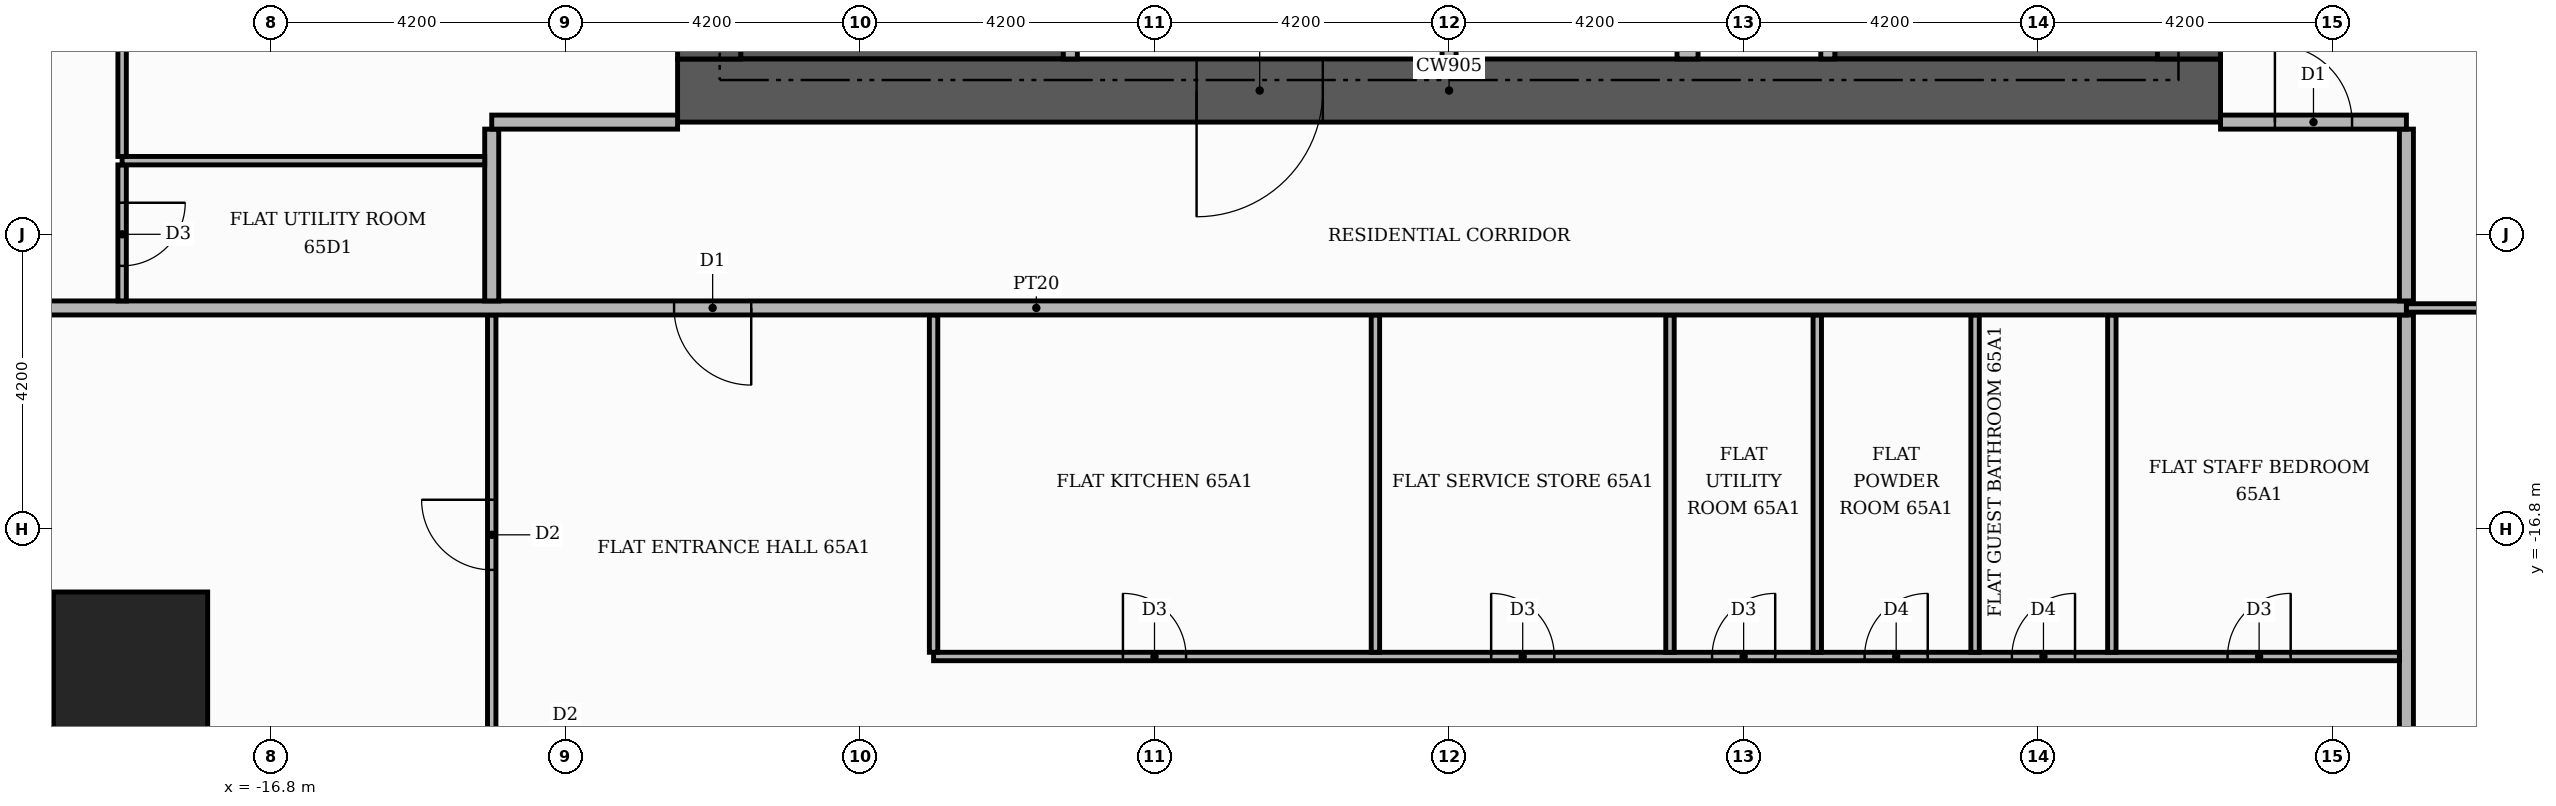
"""IFC4 building model, lengths in metres.
Left out: names, types, materials, properties, quantities, classifications, styles, units other than length and angle.
Written with IfcOpenShell. Run it as: python <this file> out.ifc"""

import sys

from ifc_helpers import new_model, si_unit, direction, frame, frame_2d, origin, origin_2d, place, context, subcontext, project, spatial, rectangle, extrude, element, fill, save


model = new_model("IFC4")
c1 = context("Model", 3, precision=1e-05, world=origin(), true_north=direction((0.0, 1.0)))
c2 = subcontext(c1, "Body", "Model", "MODEL_VIEW")
j1 = project(units=[si_unit("LENGTHUNIT", "METRE"), si_unit("PLANEANGLEUNIT", "RADIAN")], contexts=[c1])
p1 = place(None, origin())
s1 = spatial("IfcSite", under=j1, at=p1, CompositionType="ELEMENT")
p2 = place(p1, origin())
s2 = spatial("IfcBuilding", under=s1, at=p2, CompositionType="ELEMENT")
p3 = place(p2, frame((0.0, 0.0, 271.8)))
s3 = spatial("IfcBuildingStorey", under=s2, at=p3, CompositionType="ELEMENT", Elevation=271.8)
for number, where, z_axis, x_axis in (
    (1, (-10.1, -9.15, 0.0), (0.0, 0.0, 1.0), (1.0, 0.0, 0.0)),
    (2, (5.5, -9.15, 0.0), (0.0, 0.0, 1.0), (1.0, 0.0, 0.0)),
):
    element("IfcWall", number, at=place(p3, frame(where, z_axis=z_axis, x_axis=x_axis)), inside=s3, PredefinedType="SHEAR", context=c2, shape_type="SweptSolid", body=[
        extrude(rectangle(XDim=4.6, YDim=1.9, at=frame_2d((2.3, 0.0))), origin(), (0.0, 0.0, 1.0), 3.48),
    ])
p4 = place(p3, frame((-11.0, -10.55, 0.0), z_axis=(0.0, 0.0, 1.0), x_axis=(1.0, 0.0, 0.0)))
e3 = element("IfcWall", 3, at=p4, inside=s3, PredefinedType="SHEAR", context=c2, shape_type="SweptSolid", body=[
    extrude(rectangle(XDim=22.0, YDim=0.9, at=frame_2d((11.0, 0.0))), origin(), (0.0, 0.0, 1.0), 3.48),
])
p5 = place(p4, frame((7.4, 0.0, 0.0)))
e4 = element("IfcOpeningElement", 4, at=p5, cuts=e3, PredefinedType="OPENING", context=c2, shape_type="SweptSolid", body=[
    extrude(rectangle(XDim=1.8, YDim=2.2, at=frame_2d((0.9, 1.1))), frame((0.0, 0.46, 0.0), z_axis=(0.0, -1.0, 0.0), x_axis=(1.0, 0.0, 0.0)), (0.0, 0.0, 1.0), 0.92),
])
for number, where, z_axis, x_axis in (
    (5, (-10.55, -10.1, 0.0), (0.0, 0.0, 1.0), (0.0, 1.0, 0.0)),
    (6, (10.55, -10.1, 0.0), (0.0, 0.0, 1.0), (0.0, 1.0, 0.0)),
):
    element("IfcWall", number, at=place(p3, frame(where, z_axis=z_axis, x_axis=x_axis)), inside=s3, PredefinedType="SHEAR", context=c2, shape_type="SweptSolid", body=[
        extrude(rectangle(XDim=20.2, YDim=0.9, at=frame_2d((10.1, 0.0))), origin(), (0.0, 0.0, 1.0), 3.48),
    ])
p6 = place(p3, frame((-18.8, -18.8, 0.0), z_axis=(0.0, 0.0, 1.0), x_axis=(1.0, 0.0, 0.0)))
e7 = element("IfcColumn", 7, at=p6, inside=s3, PredefinedType="COLUMN", context=c2, shape_type="SweptSolid", body=[
    extrude(rectangle(XDim=2.2, YDim=2.2, at=origin_2d()), origin(), (0.0, 0.0, 1.0), 3.9),
])
p7 = place(p3, frame((-5.4, -10.1, 0.0), z_axis=(0.0, 0.0, 1.0), x_axis=(0.0, 1.0, 0.0)))
e8 = element("IfcWall", 8, at=p7, inside=s3, PredefinedType="PARTITIONING", context=c2, shape_type="SweptSolid", body=[
    extrude(rectangle(XDim=4.6, YDim=0.2, at=frame_2d((2.3, 0.0))), origin(), (0.0, 0.0, 1.0), 3.48),
])
p8 = place(p7, frame((2.9, 0.0, 0.0)))
e9 = element("IfcOpeningElement", 9, at=p8, cuts=e8, PredefinedType="OPENING", context=c2, shape_type="SweptSolid", body=[
    extrude(rectangle(XDim=1.0, YDim=2.1, at=frame_2d((0.5, 1.05))), frame((0.0, 0.11, 0.0), z_axis=(0.0, -1.0, 0.0), x_axis=(1.0, 0.0, 0.0)), (0.0, 0.0, 1.0), 0.22),
])
p9 = place(p3, frame((0.0, -10.1, 0.0), z_axis=(0.0, 0.0, 1.0), x_axis=(0.0, 1.0, 0.0)))
e10 = element("IfcWall", 10, at=p9, inside=s3, PredefinedType="PARTITIONING", context=c2, shape_type="SweptSolid", body=[
    extrude(rectangle(XDim=2.2, YDim=0.2, at=frame_2d((1.1, 0.0))), origin(), (0.0, 0.0, 1.0), 3.48),
])
p10 = place(p3, frame((3.4, -10.1, 0.0), z_axis=(0.0, 0.0, 1.0), x_axis=(0.0, 1.0, 0.0)))
e11 = element("IfcWall", 11, at=p10, inside=s3, PredefinedType="PARTITIONING", context=c2, shape_type="SweptSolid", body=[
    extrude(rectangle(XDim=2.2, YDim=0.3, at=frame_2d((1.1, 0.0))), origin(), (0.0, 0.0, 1.0), 3.48),
])
p11 = place(p3, frame((5.4, -10.1, 0.0), z_axis=(0.0, 0.0, 1.0), x_axis=(0.0, 1.0, 0.0)))
e12 = element("IfcWall", 12, at=p11, inside=s3, PredefinedType="PARTITIONING", context=c2, shape_type="SweptSolid", body=[
    extrude(rectangle(XDim=4.6, YDim=0.2, at=frame_2d((2.3, 0.0))), origin(), (0.0, 0.0, 1.0), 3.48),
])
p12 = place(p11, frame((2.9, 0.0, 0.0)))
e13 = element("IfcOpeningElement", 13, at=p12, cuts=e12, PredefinedType="OPENING", context=c2, shape_type="SweptSolid", body=[
    extrude(rectangle(XDim=1.0, YDim=2.1, at=frame_2d((0.5, 1.05))), frame((0.0, 0.11, 0.0), z_axis=(0.0, -1.0, 0.0), x_axis=(1.0, 0.0, 0.0)), (0.0, 0.0, 1.0), 0.22),
])
p13 = place(p3, frame((13.65, -25.42, 0.0), z_axis=(0.0, 0.0, 1.0), x_axis=(0.0, 1.0, 0.0)))
e14 = element("IfcWall", 14, at=p13, inside=s3, PredefinedType="PARTITIONING", context=c2, shape_type="SweptSolid", body=[
    extrude(rectangle(XDim=11.67, YDim=0.2, at=frame_2d((5.835, 0.0))), origin(), (0.0, 0.0, 1.0), 3.48),
])
p14 = place(p3, frame((-13.65, -20.06, 0.0), z_axis=(0.0, 0.0, 1.0), x_axis=(0.0, 1.0, 0.0)))
e15 = element("IfcWall", 15, at=p14, inside=s3, PredefinedType="PARTITIONING", context=c2, shape_type="SweptSolid", body=[
    extrude(rectangle(XDim=6.31, YDim=0.12, at=frame_2d((3.155, 0.0))), origin(), (0.0, 0.0, 1.0), 3.48),
])
p15 = place(p14, frame((2.675, 0.0, 0.0)))
e16 = element("IfcOpeningElement", 16, at=p15, cuts=e15, PredefinedType="OPENING", context=c2, shape_type="SweptSolid", body=[
    extrude(rectangle(XDim=1.0, YDim=2.1, at=frame_2d((0.5, 1.05))), frame((0.0, 0.07, 0.0), z_axis=(0.0, -1.0, 0.0), x_axis=(1.0, 0.0, 0.0)), (0.0, 0.0, 1.0), 0.14),
])
p16 = place(p3, frame((-7.35, -18.62, 0.0), z_axis=(0.0, 0.0, 1.0), x_axis=(1.0, 0.0, 0.0)))
e17 = element("IfcWall", 17, at=p16, inside=s3, PredefinedType="PARTITIONING", context=c2, shape_type="SweptSolid", body=[
    extrude(rectangle(XDim=20.9, YDim=0.12, at=frame_2d((10.45, 0.0))), origin(), (0.0, 0.0, 1.0), 3.48),
])
p17 = place(p16, frame((2.7, 0.0, 0.0)))
e18 = element("IfcOpeningElement", 18, at=p17, cuts=e17, PredefinedType="OPENING", context=c2, shape_type="SweptSolid", body=[
    extrude(rectangle(XDim=0.9, YDim=2.1, at=frame_2d((0.45, 1.05))), frame((0.0, 0.07, 0.0), z_axis=(0.0, -1.0, 0.0), x_axis=(1.0, 0.0, 0.0)), (0.0, 0.0, 1.0), 0.14),
])
p18 = place(p16, frame((7.95, 0.0, 0.0)))
e19 = element("IfcOpeningElement", 19, at=p18, cuts=e17, PredefinedType="OPENING", context=c2, shape_type="SweptSolid", body=[
    extrude(rectangle(XDim=0.9, YDim=2.1, at=frame_2d((0.45, 1.05))), frame((0.0, 0.07, 0.0), z_axis=(0.0, -1.0, 0.0), x_axis=(1.0, 0.0, 0.0)), (0.0, 0.0, 1.0), 0.14),
])
p19 = place(p16, frame((11.1, 0.0, 0.0)))
e20 = element("IfcOpeningElement", 20, at=p19, cuts=e17, PredefinedType="OPENING", context=c2, shape_type="SweptSolid", body=[
    extrude(rectangle(XDim=0.9, YDim=2.1, at=frame_2d((0.45, 1.05))), frame((0.0, 0.07, 0.0), z_axis=(0.0, -1.0, 0.0), x_axis=(1.0, 0.0, 0.0)), (0.0, 0.0, 1.0), 0.14),
])
p20 = place(p16, frame((13.275, 0.0, 0.0)))
e21 = element("IfcOpeningElement", 21, at=p20, cuts=e17, PredefinedType="OPENING", context=c2, shape_type="SweptSolid", body=[
    extrude(rectangle(XDim=0.9, YDim=2.1, at=frame_2d((0.45, 1.05))), frame((0.0, 0.07, 0.0), z_axis=(0.0, -1.0, 0.0), x_axis=(1.0, 0.0, 0.0)), (0.0, 0.0, 1.0), 0.14),
])
p21 = place(p16, frame((15.375, 0.0, 0.0)))
e22 = element("IfcOpeningElement", 22, at=p21, cuts=e17, PredefinedType="OPENING", context=c2, shape_type="SweptSolid", body=[
    extrude(rectangle(XDim=0.9, YDim=2.1, at=frame_2d((0.45, 1.05))), frame((0.0, 0.07, 0.0), z_axis=(0.0, -1.0, 0.0), x_axis=(1.0, 0.0, 0.0)), (0.0, 0.0, 1.0), 0.14),
])
p22 = place(p16, frame((18.45, 0.0, 0.0)))
e23 = element("IfcOpeningElement", 23, at=p22, cuts=e17, PredefinedType="OPENING", context=c2, shape_type="SweptSolid", body=[
    extrude(rectangle(XDim=0.9, YDim=2.1, at=frame_2d((0.45, 1.05))), frame((0.0, 0.07, 0.0), z_axis=(0.0, -1.0, 0.0), x_axis=(1.0, 0.0, 0.0)), (0.0, 0.0, 1.0), 0.14),
])
for number, where, z_axis, x_axis in (
    (24, (-7.35, -18.56, 0.0), (0.0, 0.0, 1.0), (0.0, 1.0, 0.0)),
    (25, (-1.05, -18.56, 0.0), (0.0, 0.0, 1.0), (0.0, 1.0, 0.0)),
    (26, (3.15, -18.56, 0.0), (0.0, 0.0, 1.0), (0.0, 1.0, 0.0)),
    (27, (5.25, -18.56, 0.0), (0.0, 0.0, 1.0), (0.0, 1.0, 0.0)),
    (28, (7.5, -18.56, 0.0), (0.0, 0.0, 1.0), (0.0, 1.0, 0.0)),
    (29, (9.45, -18.56, 0.0), (0.0, 0.0, 1.0), (0.0, 1.0, 0.0)),
):
    element("IfcWall", number, at=place(p3, frame(where, z_axis=z_axis, x_axis=x_axis)), inside=s3, PredefinedType="PARTITIONING", context=c2, shape_type="SweptSolid", body=[
        extrude(rectangle(XDim=4.81, YDim=0.12, at=frame_2d((2.405, 0.0))), origin(), (0.0, 0.0, 1.0), 3.48),
    ])
p23 = place(p3, frame((-25.42, -13.65, 0.0), z_axis=(0.0, 0.0, 1.0), x_axis=(1.0, 0.0, 0.0)))
e30 = element("IfcWall", 30, at=p23, inside=s3, PredefinedType="PARTITIONING", context=c2, shape_type="SweptSolid", body=[
    extrude(rectangle(XDim=39.07, YDim=0.2, at=frame_2d((19.535, 0.0))), origin(), (0.0, 0.0, 1.0), 3.48),
])
p24 = place(p23, frame((14.37, 0.0, 0.0)))
e31 = element("IfcOpeningElement", 31, at=p24, cuts=e30, PredefinedType="OPENING", context=c2, shape_type="SweptSolid", body=[
    extrude(rectangle(XDim=1.1, YDim=2.4, at=frame_2d((0.55, 1.2))), frame((0.0, 0.11, 0.0), z_axis=(0.0, -1.0, 0.0), x_axis=(1.0, 0.0, 0.0)), (0.0, 0.0, 1.0), 0.22),
])
p25 = place(p3, frame((13.65, -13.65, 0.0), z_axis=(0.0, 0.0, 1.0), x_axis=(1.0, 0.0, 0.0)))
e32 = element("IfcWall", 32, at=p25, inside=s3, PredefinedType="PARTITIONING", context=c2, shape_type="SweptSolid", body=[
    extrude(rectangle(XDim=6.17, YDim=0.12, at=frame_2d((3.085, 0.0))), origin(), (0.0, 0.0, 1.0), 3.48),
])
p26 = place(p25, frame((2.635, 0.0, 0.0)))
e33 = element("IfcOpeningElement", 33, at=p26, cuts=e32, PredefinedType="OPENING", context=c2, shape_type="SweptSolid", body=[
    extrude(rectangle(XDim=0.9, YDim=2.1, at=frame_2d((0.45, 1.05))), frame((0.0, 0.07, 0.0), z_axis=(0.0, -1.0, 0.0), x_axis=(1.0, 0.0, 0.0)), (0.0, 0.0, 1.0), 0.14),
])
p27 = place(p3, frame((-18.92, -13.55, 0.0), z_axis=(0.0, 0.0, 1.0), x_axis=(0.0, 1.0, 0.0)))
e34 = element("IfcWall", 34, at=p27, inside=s3, PredefinedType="PARTITIONING", context=c2, shape_type="SweptSolid", body=[
    extrude(rectangle(XDim=1.94, YDim=0.12, at=frame_2d((0.97, 0.0))), origin(), (0.0, 0.0, 1.0), 3.48),
])
p28 = place(p27, frame((0.5, 0.0, 0.0)))
e35 = element("IfcOpeningElement", 35, at=p28, cuts=e34, PredefinedType="OPENING", context=c2, shape_type="SweptSolid", body=[
    extrude(rectangle(XDim=0.9, YDim=2.1, at=frame_2d((0.45, 1.05))), frame((0.0, 0.07, 0.0), z_axis=(0.0, -1.0, 0.0), x_axis=(1.0, 0.0, 0.0)), (0.0, 0.0, 1.0), 0.14),
])
for number, where, z_axis, x_axis in (
    (36, (-13.65, -13.55, 0.0), (0.0, 0.0, 1.0), (0.0, 1.0, 0.0)),
    (37, (13.65, -13.55, 0.0), (0.0, 0.0, 1.0), (0.0, 1.0, 0.0)),
):
    element("IfcWall", number, at=place(p3, frame(where, z_axis=z_axis, x_axis=x_axis)), inside=s3, PredefinedType="PARTITIONING", context=c2, shape_type="SweptSolid", body=[
        extrude(rectangle(XDim=2.45, YDim=0.2, at=frame_2d((1.225, 0.0))), origin(), (0.0, 0.0, 1.0), 3.48),
    ])
p29 = place(p3, frame((-18.92, -11.55, 0.0), z_axis=(0.0, 0.0, 1.0), x_axis=(1.0, 0.0, 0.0)))
e38 = element("IfcWall", 38, at=p29, inside=s3, PredefinedType="PARTITIONING", context=c2, shape_type="SweptSolid", body=[
    extrude(rectangle(XDim=5.17, YDim=0.12, at=frame_2d((2.585, 0.0))), origin(), (0.0, 0.0, 1.0), 3.48),
])
p30 = place(p3, frame((-18.92, -11.49, 0.0), z_axis=(0.0, 0.0, 1.0), x_axis=(0.0, 1.0, 0.0)))
e39 = element("IfcWall", 39, at=p30, inside=s3, PredefinedType="PARTITIONING", context=c2, shape_type="SweptSolid", body=[
    extrude(rectangle(XDim=4.38, YDim=0.12, at=frame_2d((2.19, 0.0))), origin(), (0.0, 0.0, 1.0), 3.48),
])
p31 = place(p30, frame((1.74, 0.0, 0.0)))
e40 = element("IfcOpeningElement", 40, at=p31, cuts=e39, PredefinedType="OPENING", context=c2, shape_type="SweptSolid", body=[
    extrude(rectangle(XDim=0.9, YDim=2.1, at=frame_2d((0.45, 1.05))), frame((0.0, 0.07, 0.0), z_axis=(0.0, -1.0, 0.0), x_axis=(1.0, 0.0, 0.0)), (0.0, 0.0, 1.0), 0.14),
])
p32 = place(p3, frame((-13.65, -11.0, 0.0), z_axis=(0.0, 0.0, 1.0), x_axis=(1.0, 0.0, 0.0)))
e41 = element("IfcWall", 41, at=p32, inside=s3, PredefinedType="PARTITIONING", context=c2, shape_type="SweptSolid", body=[
    extrude(rectangle(XDim=2.65, YDim=0.2, at=frame_2d((1.325, 0.0))), origin(), (0.0, 0.0, 1.0), 3.48),
])
p33 = place(p3, frame((11.0, -11.0, 0.0), z_axis=(0.0, 0.0, 1.0), x_axis=(1.0, 0.0, 0.0)))
e42 = element("IfcWall", 42, at=p33, inside=s3, PredefinedType="PARTITIONING", context=c2, shape_type="SweptSolid", body=[
    extrude(rectangle(XDim=2.65, YDim=0.2, at=frame_2d((1.325, 0.0))), origin(), (0.0, 0.0, 1.0), 3.48),
])
p34 = place(p33, frame((0.775, 0.0, 0.0)))
e43 = element("IfcOpeningElement", 43, at=p34, cuts=e42, PredefinedType="OPENING", context=c2, shape_type="SweptSolid", body=[
    extrude(rectangle(XDim=1.1, YDim=2.4, at=frame_2d((0.55, 1.2))), frame((0.0, 0.11, 0.0), z_axis=(0.0, -1.0, 0.0), x_axis=(1.0, 0.0, 0.0)), (0.0, 0.0, 1.0), 0.22),
])
p35 = place(p5, frame((1.8, 0.0, 0.0), z_axis=(0.0, 0.0, 1.0), x_axis=(-1.0, 0.0, 0.0)))
e44 = element("IfcDoor", 44, at=p35, inside=s3, OperationType="DOUBLE_DOOR_SINGLE_SWING", PredefinedType="DOOR", context=c2, shape_type="SweptSolid", body=[
    extrude(rectangle(XDim=1.8, YDim=2.2, at=frame_2d((0.9, 1.1))), frame((0.0, 0.025, 0.0), z_axis=(0.0, -1.0, 0.0), x_axis=(1.0, 0.0, 0.0)), (0.0, 0.0, 1.0), 0.05),
])
fill(e4, e44)
p36 = place(p24, frame((1.1, 0.0, 0.0), z_axis=(0.0, 0.0, 1.0), x_axis=(-1.0, 0.0, 0.0)))
e45 = element("IfcDoor", 45, at=p36, inside=s3, OperationType="SINGLE_SWING_RIGHT", PredefinedType="DOOR", context=c2, shape_type="SweptSolid", body=[
    extrude(rectangle(XDim=1.1, YDim=2.4, at=frame_2d((0.55, 1.2))), frame((0.0, 0.025, 0.0), z_axis=(0.0, -1.0, 0.0), x_axis=(1.0, 0.0, 0.0)), (0.0, 0.0, 1.0), 0.05),
])
fill(e31, e45)
p37 = place(p15, origin())
e46 = element("IfcDoor", 46, at=p37, inside=s3, OperationType="SINGLE_SWING_RIGHT", PredefinedType="DOOR", context=c2, shape_type="SweptSolid", body=[
    extrude(rectangle(XDim=1.0, YDim=2.1, at=frame_2d((0.5, 1.05))), frame((0.0, 0.025, 0.0), z_axis=(0.0, -1.0, 0.0), x_axis=(1.0, 0.0, 0.0)), (0.0, 0.0, 1.0), 0.05),
])
fill(e16, e46)
p38 = place(p17, origin())
e47 = element("IfcDoor", 47, at=p38, inside=s3, OperationType="SINGLE_SWING_LEFT", PredefinedType="DOOR", context=c2, shape_type="SweptSolid", body=[
    extrude(rectangle(XDim=0.9, YDim=2.1, at=frame_2d((0.45, 1.05))), frame((0.0, 0.025, 0.0), z_axis=(0.0, -1.0, 0.0), x_axis=(1.0, 0.0, 0.0)), (0.0, 0.0, 1.0), 0.05),
])
fill(e18, e47)
p39 = place(p18, origin())
e48 = element("IfcDoor", 48, at=p39, inside=s3, OperationType="SINGLE_SWING_LEFT", PredefinedType="DOOR", context=c2, shape_type="SweptSolid", body=[
    extrude(rectangle(XDim=0.9, YDim=2.1, at=frame_2d((0.45, 1.05))), frame((0.0, 0.025, 0.0), z_axis=(0.0, -1.0, 0.0), x_axis=(1.0, 0.0, 0.0)), (0.0, 0.0, 1.0), 0.05),
])
fill(e19, e48)
p40 = place(p19, origin())
e49 = element("IfcDoor", 49, at=p40, inside=s3, OperationType="SINGLE_SWING_RIGHT", PredefinedType="DOOR", context=c2, shape_type="SweptSolid", body=[
    extrude(rectangle(XDim=0.9, YDim=2.1, at=frame_2d((0.45, 1.05))), frame((0.0, 0.025, 0.0), z_axis=(0.0, -1.0, 0.0), x_axis=(1.0, 0.0, 0.0)), (0.0, 0.0, 1.0), 0.05),
])
fill(e20, e49)
p41 = place(p20, origin())
e50 = element("IfcDoor", 50, at=p41, inside=s3, OperationType="SINGLE_SWING_RIGHT", PredefinedType="DOOR", context=c2, shape_type="SweptSolid", body=[
    extrude(rectangle(XDim=0.9, YDim=2.1, at=frame_2d((0.45, 1.05))), frame((0.0, 0.025, 0.0), z_axis=(0.0, -1.0, 0.0), x_axis=(1.0, 0.0, 0.0)), (0.0, 0.0, 1.0), 0.05),
])
fill(e21, e50)
p42 = place(p21, origin())
e51 = element("IfcDoor", 51, at=p42, inside=s3, OperationType="SINGLE_SWING_RIGHT", PredefinedType="DOOR", context=c2, shape_type="SweptSolid", body=[
    extrude(rectangle(XDim=0.9, YDim=2.1, at=frame_2d((0.45, 1.05))), frame((0.0, 0.025, 0.0), z_axis=(0.0, -1.0, 0.0), x_axis=(1.0, 0.0, 0.0)), (0.0, 0.0, 1.0), 0.05),
])
fill(e22, e51)
p43 = place(p22, origin())
e52 = element("IfcDoor", 52, at=p43, inside=s3, OperationType="SINGLE_SWING_RIGHT", PredefinedType="DOOR", context=c2, shape_type="SweptSolid", body=[
    extrude(rectangle(XDim=0.9, YDim=2.1, at=frame_2d((0.45, 1.05))), frame((0.0, 0.025, 0.0), z_axis=(0.0, -1.0, 0.0), x_axis=(1.0, 0.0, 0.0)), (0.0, 0.0, 1.0), 0.05),
])
fill(e23, e52)
p44 = place(p34, origin())
e53 = element("IfcDoor", 53, at=p44, inside=s3, OperationType="SINGLE_SWING_LEFT", PredefinedType="DOOR", context=c2, shape_type="SweptSolid", body=[
    extrude(rectangle(XDim=1.1, YDim=2.4, at=frame_2d((0.55, 1.2))), frame((0.0, 0.025, 0.0), z_axis=(0.0, -1.0, 0.0), x_axis=(1.0, 0.0, 0.0)), (0.0, 0.0, 1.0), 0.05),
])
fill(e43, e53)
p45 = place(p28, frame((0.9, 0.0, 0.0), z_axis=(0.0, 0.0, 1.0), x_axis=(-1.0, 0.0, 0.0)))
e54 = element("IfcDoor", 54, at=p45, inside=s3, OperationType="SINGLE_SWING_RIGHT", PredefinedType="DOOR", context=c2, shape_type="SweptSolid", body=[
    extrude(rectangle(XDim=0.9, YDim=2.1, at=frame_2d((0.45, 1.05))), frame((0.0, 0.025, 0.0), z_axis=(0.0, -1.0, 0.0), x_axis=(1.0, 0.0, 0.0)), (0.0, 0.0, 1.0), 0.05),
])
fill(e35, e54)
save(model, sys.argv[1])
